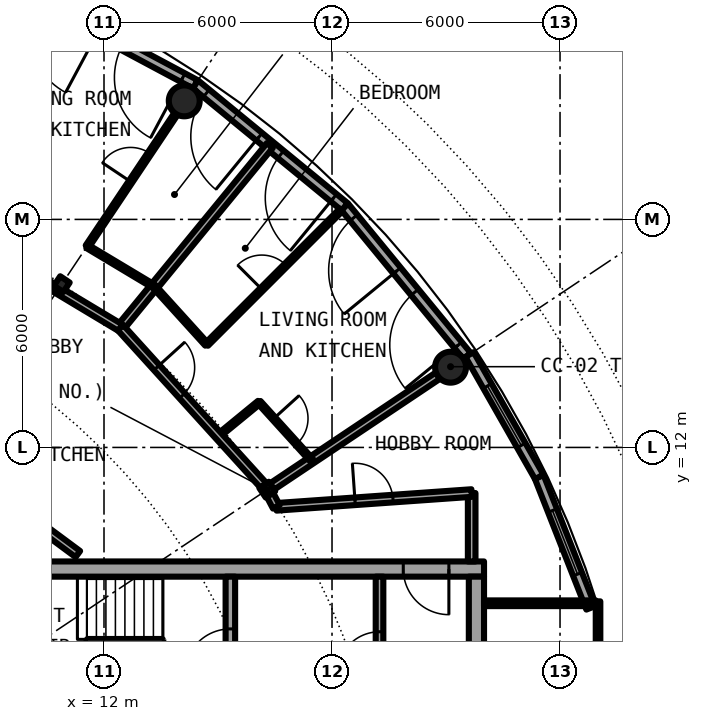
"""IFC4 building model, lengths in metres.
Left out: names, types, materials, properties, quantities, classifications, styles, units other than length and angle.
Written with IfcOpenShell. Run it as: python <this file> out.ifc"""

import sys

from ifc_helpers import new_model, si_unit, direction, frame, frame_2d, origin, origin_2d, place, context, subcontext, project, spatial, rectangle, hollow_circle, i_section, extrude, element, fill, save


model = new_model("IFC4")
c1 = context("Model", 3, precision=1e-05, world=origin(), true_north=direction((0.0, 1.0)))
c2 = subcontext(c1, "Body", "Model", "MODEL_VIEW")
j1 = project(units=[si_unit("LENGTHUNIT", "METRE"), si_unit("PLANEANGLEUNIT", "RADIAN")], contexts=[c1])
p1 = place(None, origin())
s1 = spatial("IfcSite", under=j1, at=p1, CompositionType="ELEMENT")
p2 = place(p1, origin())
s2 = spatial("IfcBuilding", under=s1, at=p2, CompositionType="ELEMENT")
p3 = place(p2, frame((0.0, 0.0, 237.1)))
s3 = spatial("IfcBuildingStorey", under=s2, at=p3, CompositionType="ELEMENT", Elevation=237.1)
for number, where, z_axis, x_axis in (
    (1, (21.119, 14.112, 0.0), (0.0, 0.0, 1.0), (1.0, 0.0, 0.0)),
    (2, (14.112, 21.119, 0.0), (0.0, 0.0, 1.0), (1.0, 0.0, 0.0)),
):
    element("IfcColumn", number, at=place(p3, frame(where, z_axis=z_axis, x_axis=x_axis)), inside=s3, PredefinedType="COLUMN", context=c2, shape_type="SweptSolid", body=[
        extrude(hollow_circle(Radius=0.406, WallThickness=0.03, at=origin_2d()), origin(), (0.0, 0.0, 1.0), 3.05),
    ])
for number, where, z_axis, x_axis in (
    (3, (16.297, 10.889, 0.0), (0.0, 0.0, 1.0), (0.831, 0.556, 0.0)),
    (4, (10.889, 16.297, 0.0), (0.0, 0.0, 1.0), (0.556, 0.831, 0.0)),
):
    element("IfcColumn", number, at=place(p3, frame(where, z_axis=z_axis, x_axis=x_axis)), inside=s3, PredefinedType="COLUMN", context=c2, shape_type="SweptSolid", body=[
        extrude(i_section(OverallWidth=0.3, OverallDepth=0.3, WebThickness=0.011, FlangeThickness=0.019, FilletRadius=0.027, at=origin_2d()), origin(), (0.0, 0.0, 1.0), 3.05),
    ])
p4 = place(p3, frame((21.556, 14.403, 0.0), z_axis=(0.0, 0.0, 1.0), x_axis=(-0.63433059803, 0.77306189429, 0.0)))
e5 = element("IfcWall", 5, at=p4, inside=s3, PredefinedType="SOLIDWALL", context=c2, shape_type="SweptSolid", body=[
    extrude(rectangle(XDim=5.082, YDim=0.25, at=frame_2d((2.541, 0.0))), origin(), (0.0, 0.0, 1.0), 2.7),
])
p5 = place(p4, frame((0.374, 0.0, 0.0)))
e6 = element("IfcOpeningElement", 6, at=p5, cuts=e5, PredefinedType="OPENING", context=c2, shape_type="SweptSolid", body=[
    extrude(rectangle(XDim=1.8, YDim=2.2, at=frame_2d((0.9, 1.1))), frame((0.0, 0.135, 0.0), z_axis=(0.0, -1.0, 0.0), x_axis=(1.0, 0.0, 0.0)), (0.0, 0.0, 1.0), 0.27),
])
p6 = place(p4, frame((2.909, 0.0, 0.0)))
e7 = element("IfcOpeningElement", 7, at=p6, cuts=e5, PredefinedType="OPENING", context=c2, shape_type="SweptSolid", body=[
    extrude(rectangle(XDim=1.8, YDim=2.2, at=frame_2d((0.9, 1.1))), frame((0.0, 0.135, 0.0), z_axis=(0.0, -1.0, 0.0), x_axis=(1.0, 0.0, 0.0)), (0.0, 0.0, 1.0), 0.27),
])
p7 = place(p3, frame((18.332, 18.332, 0.0), z_axis=(0.0, 0.0, 1.0), x_axis=(-0.77306189429, 0.63433059803, 0.0)))
e8 = element("IfcWall", 8, at=p7, inside=s3, PredefinedType="SOLIDWALL", context=c2, shape_type="SweptSolid", body=[
    extrude(rectangle(XDim=5.082, YDim=0.25, at=frame_2d((2.541, 0.0))), origin(), (0.0, 0.0, 1.0), 2.7),
])
p8 = place(p7, frame((0.374, 0.0, 0.0)))
e9 = element("IfcOpeningElement", 9, at=p8, cuts=e8, PredefinedType="OPENING", context=c2, shape_type="SweptSolid", body=[
    extrude(rectangle(XDim=1.8, YDim=2.2, at=frame_2d((0.9, 1.1))), frame((0.0, 0.135, 0.0), z_axis=(0.0, -1.0, 0.0), x_axis=(1.0, 0.0, 0.0)), (0.0, 0.0, 1.0), 0.27),
])
p9 = place(p7, frame((2.909, 0.0, 0.0)))
e10 = element("IfcOpeningElement", 10, at=p9, cuts=e8, PredefinedType="OPENING", context=c2, shape_type="SweptSolid", body=[
    extrude(rectangle(XDim=1.8, YDim=2.2, at=frame_2d((0.9, 1.1))), frame((0.0, 0.135, 0.0), z_axis=(0.0, -1.0, 0.0), x_axis=(1.0, 0.0, 0.0)), (0.0, 0.0, 1.0), 0.27),
])
p10 = place(p3, frame((14.403, 21.556, 0.0), z_axis=(0.0, 0.0, 1.0), x_axis=(-0.881903089468, 0.47143073806, 0.0)))
e11 = element("IfcWall", 11, at=p10, inside=s3, PredefinedType="SOLIDWALL", context=c2, shape_type="SweptSolid", body=[
    extrude(rectangle(XDim=5.082, YDim=0.25, at=frame_2d((2.541, 0.0))), origin(), (0.0, 0.0, 1.0), 2.7),
])
p11 = place(p10, frame((0.374, 0.0, 0.0)))
e12 = element("IfcOpeningElement", 12, at=p11, cuts=e11, PredefinedType="OPENING", context=c2, shape_type="SweptSolid", body=[
    extrude(rectangle(XDim=1.8, YDim=2.2, at=frame_2d((0.9, 1.1))), frame((0.0, 0.135, 0.0), z_axis=(0.0, -1.0, 0.0), x_axis=(1.0, 0.0, 0.0)), (0.0, 0.0, 1.0), 0.27),
])
p12 = place(p10, frame((2.909, 0.0, 0.0)))
e13 = element("IfcOpeningElement", 13, at=p12, cuts=e11, PredefinedType="OPENING", context=c2, shape_type="SweptSolid", body=[
    extrude(rectangle(XDim=1.8, YDim=2.2, at=frame_2d((0.9, 1.1))), frame((0.0, 0.135, 0.0), z_axis=(0.0, -1.0, 0.0), x_axis=(1.0, 0.0, 0.0)), (0.0, 0.0, 1.0), 0.27),
])
p13 = place(p3, frame((24.809, 7.779, 0.0), z_axis=(0.0, 0.0, 1.0), x_axis=(-0.366351636034, 0.930476479432, 0.0)))
e14 = element("IfcWall", 14, at=p13, inside=s3, PredefinedType="SOLIDWALL", context=c2, shape_type="SweptSolid", body=[
    extrude(rectangle(XDim=3.705, YDim=0.25, at=frame_2d((1.852, 0.0))), origin(), (0.0, 0.0, 1.0), 2.7),
])
p14 = place(p13, frame((0.952, 0.0, 0.3)))
e15 = element("IfcOpeningElement", 15, at=p14, cuts=e14, PredefinedType="OPENING", context=c2, shape_type="SweptSolid", body=[
    extrude(rectangle(XDim=1.8, YDim=2.1, at=frame_2d((0.9, 1.05))), frame((0.0, 0.135, 0.0), z_axis=(0.0, -1.0, 0.0), x_axis=(1.0, 0.0, 0.0)), (0.0, 0.0, 1.0), 0.27),
])
p15 = place(p3, frame((23.452, 11.226, 0.0), z_axis=(0.0, 0.0, 1.0), x_axis=(-0.495031435966, 0.868875064325, 0.0)))
e16 = element("IfcWall", 16, at=p15, inside=s3, PredefinedType="SOLIDWALL", context=c2, shape_type="SweptSolid", body=[
    extrude(rectangle(XDim=3.705, YDim=0.25, at=frame_2d((1.853, 0.0))), origin(), (0.0, 0.0, 1.0), 2.7),
])
p16 = place(p15, frame((0.952, 0.0, 0.3)))
e17 = element("IfcOpeningElement", 17, at=p16, cuts=e16, PredefinedType="OPENING", context=c2, shape_type="SweptSolid", body=[
    extrude(rectangle(XDim=1.8, YDim=2.1, at=frame_2d((0.9, 1.05))), frame((0.0, 0.135, 0.0), z_axis=(0.0, -1.0, 0.0), x_axis=(1.0, 0.0, 0.0)), (0.0, 0.0, 1.0), 0.27),
])
p17 = place(p3, frame((22.0, 8.8, 0.0), z_axis=(0.0, 0.0, 1.0), x_axis=(-1.0, 0.0, 0.0)))
e18 = element("IfcWall", 18, at=p17, inside=s3, PredefinedType="SHEAR", context=c2, shape_type="SweptSolid", body=[
    extrude(rectangle(XDim=13.4, YDim=0.4, at=frame_2d((6.7, 0.0))), origin(), (0.0, 0.0, 1.0), 3.05),
])
p18 = place(p17, frame((0.925, 0.0, 0.0)))
e19 = element("IfcOpeningElement", 19, at=p18, cuts=e18, PredefinedType="OPENING", context=c2, shape_type="SweptSolid", body=[
    extrude(rectangle(XDim=1.2, YDim=2.3, at=frame_2d((0.6, 1.15))), frame((0.0, 0.21, 0.0), z_axis=(0.0, -1.0, 0.0), x_axis=(1.0, 0.0, 0.0)), (0.0, 0.0, 1.0), 0.42),
])
p19 = place(p3, frame((21.8, 8.6, 0.0), z_axis=(0.0, 0.0, 1.0), x_axis=(0.0, -1.0, 0.0)))
e20 = element("IfcWall", 20, at=p19, inside=s3, PredefinedType="SHEAR", context=c2, shape_type="SweptSolid", body=[
    extrude(rectangle(XDim=17.2, YDim=0.4, at=frame_2d((8.6, 0.0))), origin(), (0.0, 0.0, 1.0), 3.05),
])
p20 = place(p19, frame((7.7, 0.0, 0.0)))
e21 = element("IfcOpeningElement", 21, at=p20, cuts=e20, PredefinedType="OPENING", context=c2, shape_type="SweptSolid", body=[
    extrude(rectangle(XDim=1.8, YDim=2.3, at=frame_2d((0.9, 1.15))), frame((0.0, 0.21, 0.0), z_axis=(0.0, -1.0, 0.0), x_axis=(1.0, 0.0, 0.0)), (0.0, 0.0, 1.0), 0.42),
])
p21 = place(p3, frame((15.325, 4.65, 0.0), z_axis=(0.0, 0.0, 1.0), x_axis=(0.0, 1.0, 0.0)))
e22 = element("IfcWall", 22, at=p21, inside=s3, PredefinedType="SHEAR", context=c2, shape_type="SweptSolid", body=[
    extrude(rectangle(XDim=3.95, YDim=0.25, at=frame_2d((1.975, 0.0))), origin(), (0.0, 0.0, 1.0), 3.05),
])
p22 = place(p21, frame((1.375, 0.0, 0.0)))
e23 = element("IfcOpeningElement", 23, at=p22, cuts=e22, PredefinedType="OPENING", context=c2, shape_type="SweptSolid", body=[
    extrude(rectangle(XDim=1.2, YDim=2.3, at=frame_2d((0.6, 1.15))), frame((0.0, 0.135, 0.0), z_axis=(0.0, -1.0, 0.0), x_axis=(1.0, 0.0, 0.0)), (0.0, 0.0, 1.0), 0.27),
])
p23 = place(p3, frame((19.25, 1.575, 0.0), z_axis=(0.0, 0.0, 1.0), x_axis=(0.0, 1.0, 0.0)))
e24 = element("IfcWall", 24, at=p23, inside=s3, PredefinedType="SOLIDWALL", context=c2, shape_type="SweptSolid", body=[
    extrude(rectangle(XDim=7.025, YDim=0.2, at=frame_2d((3.513, 0.0))), origin(), (0.0, 0.0, 1.0), 2.7),
])
p24 = place(p23, frame((4.475, 0.0, 0.0)))
e25 = element("IfcOpeningElement", 25, at=p24, cuts=e24, PredefinedType="OPENING", context=c2, shape_type="SweptSolid", body=[
    extrude(rectangle(XDim=1.1, YDim=2.3, at=frame_2d((0.55, 1.15))), frame((0.0, 0.11, 0.0), z_axis=(0.0, -1.0, 0.0), x_axis=(1.0, 0.0, 0.0)), (0.0, 0.0, 1.0), 0.22),
])
p25 = place(p3, frame((22.0, 7.9, 0.0), z_axis=(0.0, 0.0, 1.0), x_axis=(1.0, 0.0, 0.0)))
e26 = element("IfcWall", 26, at=p25, inside=s3, PredefinedType="PARTITIONING", context=c2, shape_type="SweptSolid", body=[
    extrude(rectangle(XDim=2.94, YDim=0.15, at=frame_2d((1.47, 0.0))), origin(), (0.0, 0.0, 1.0), 2.7),
])
p26 = place(p3, frame((25.0, -7.95, 0.0), z_axis=(0.0, 0.0, 1.0), x_axis=(0.0, 1.0, 0.0)))
e27 = element("IfcWall", 27, at=p26, inside=s3, PredefinedType="PARTITIONING", context=c2, shape_type="SweptSolid", body=[
    extrude(rectangle(XDim=15.9, YDim=0.12, at=frame_2d((7.95, 0.0))), origin(), (0.0, 0.0, 1.0), 2.7),
])
p27 = place(p26, frame((0.95, 0.0, 0.1)))
e28 = element("IfcOpeningElement", 28, at=p27, cuts=e27, PredefinedType="OPENING", context=c2, shape_type="SweptSolid", body=[
    extrude(rectangle(XDim=14.0, YDim=2.35, at=frame_2d((7.0, 1.175))), frame((0.0, 0.07, 0.0), z_axis=(0.0, -1.0, 0.0), x_axis=(1.0, 0.0, 0.0)), (0.0, 0.0, 1.0), 0.14),
])
p28 = place(p3, frame((21.675, 9.0, 0.0), z_axis=(0.0, 0.0, 1.0), x_axis=(0.0, 1.0, 0.0)))
e29 = element("IfcWall", 29, at=p28, inside=s3, PredefinedType="PARTITIONING", context=c2, shape_type="SweptSolid", body=[
    extrude(rectangle(XDim=1.8, YDim=0.2, at=frame_2d((0.9, 0.0))), origin(), (0.0, 0.0, 1.0), 2.7),
])
p29 = place(p3, frame((11.56, 17.289, 0.0), z_axis=(0.0, 0.0, 1.0), x_axis=(0.555959489687, 0.831209387475, 0.0)))
e30 = element("IfcWall", 30, at=p29, inside=s3, PredefinedType="PARTITIONING", context=c2, shape_type="SweptSolid", body=[
    extrude(rectangle(XDim=4.203, YDim=0.1, at=frame_2d((2.102, 0.0))), origin(), (0.0, 0.0, 1.0), 2.7),
])
p30 = place(p29, frame((2.051, 0.0, 0.0)))
e31 = element("IfcOpeningElement", 31, at=p30, cuts=e30, PredefinedType="OPENING", context=c2, shape_type="SweptSolid", body=[
    extrude(rectangle(XDim=0.9, YDim=2.3, at=frame_2d((0.45, 1.15))), frame((0.0, 0.06, 0.0), z_axis=(0.0, -1.0, 0.0), x_axis=(1.0, 0.0, 0.0)), (0.0, 0.0, 1.0), 0.12),
])
p31 = place(p3, frame((12.432, 15.153, 0.0), z_axis=(0.0, 0.0, 1.0), x_axis=(0.634356436091, 0.773040692324, 0.0)))
e32 = element("IfcWall", 32, at=p31, inside=s3, PredefinedType="PARTITIONING", context=c2, shape_type="SweptSolid", body=[
    extrude(rectangle(XDim=6.2, YDim=0.2, at=frame_2d((3.1, 0.0))), origin(), (0.0, 0.0, 1.0), 2.7),
])
p32 = place(p3, frame((14.702, 14.711, 0.0), z_axis=(0.0, 0.0, 1.0), x_axis=(0.706911528738, 0.707301979735, 0.0)))
e33 = element("IfcWall", 33, at=p32, inside=s3, PredefinedType="PARTITIONING", context=c2, shape_type="SweptSolid", body=[
    extrude(rectangle(XDim=5.002, YDim=0.1, at=frame_2d((2.501, 0.0))), origin(), (0.0, 0.0, 1.0), 2.7),
])
p33 = place(p32, frame((2.051, 0.0, 0.0)))
e34 = element("IfcOpeningElement", 34, at=p33, cuts=e33, PredefinedType="OPENING", context=c2, shape_type="SweptSolid", body=[
    extrude(rectangle(XDim=0.9, YDim=2.3, at=frame_2d((0.45, 1.15))), frame((0.0, 0.06, 0.0), z_axis=(0.0, -1.0, 0.0), x_axis=(1.0, 0.0, 0.0)), (0.0, 0.0, 1.0), 0.12),
])
p34 = place(p3, frame((15.011, 12.308, 0.0), z_axis=(0.0, 0.0, 1.0), x_axis=(0.773321325714, 0.634014295735, 0.0)))
e35 = element("IfcWall", 35, at=p34, inside=s3, PredefinedType="PARTITIONING", context=c2, shape_type="SweptSolid", body=[
    extrude(rectangle(XDim=1.386, YDim=0.1, at=frame_2d((0.693, 0.0))), origin(), (0.0, 0.0, 1.0), 2.7),
])
p35 = place(p3, frame((16.422, 10.972, 0.0), z_axis=(0.0, 0.0, 1.0), x_axis=(0.831406006746, 0.555665413668, 0.0)))
e36 = element("IfcWall", 36, at=p35, inside=s3, PredefinedType="PARTITIONING", context=c2, shape_type="SweptSolid", body=[
    extrude(rectangle(XDim=5.251, YDim=0.2, at=frame_2d((2.625, 0.0))), origin(), (0.0, 0.0, 1.0), 2.7),
])
p36 = place(p3, frame((16.535, 10.437, 0.0), z_axis=(0.0, 0.0, 1.0), x_axis=(0.997515141784, 0.070452408845, 0.0)))
e37 = element("IfcWall", 37, at=p36, inside=s3, PredefinedType="PARTITIONING", context=c2, shape_type="SweptSolid", body=[
    extrude(rectangle(XDim=5.153, YDim=0.2, at=frame_2d((2.576, 0.0))), origin(), (0.0, 0.0, 1.0), 2.7),
])
p37 = place(p36, frame((2.076, 0.0, 0.0)))
e38 = element("IfcOpeningElement", 38, at=p37, cuts=e37, PredefinedType="OPENING", context=c2, shape_type="SweptSolid", body=[
    extrude(rectangle(XDim=1.0, YDim=2.3, at=frame_2d((0.5, 1.15))), frame((0.0, 0.11, 0.0), z_axis=(0.0, -1.0, 0.0), x_axis=(1.0, 0.0, 0.0)), (0.0, 0.0, 1.0), 0.22),
])
p38 = place(p3, frame((4.357, 14.353, 0.0), z_axis=(0.0, 0.0, 1.0), x_axis=(0.803168959756, -0.595751308923, 0.0)))
e39 = element("IfcWall", 39, at=p38, inside=s3, PredefinedType="PARTITIONING", context=c2, shape_type="SweptSolid", body=[
    extrude(rectangle(XDim=8.659, YDim=0.2, at=frame_2d((4.33, 0.0))), origin(), (0.0, 0.0, 1.0), 2.7),
])
p39 = place(p38, frame((3.829, 0.0, 0.0)))
e40 = element("IfcOpeningElement", 40, at=p39, cuts=e39, PredefinedType="OPENING", context=c2, shape_type="SweptSolid", body=[
    extrude(rectangle(XDim=1.0, YDim=2.3, at=frame_2d((0.5, 1.15))), frame((0.0, 0.11, 0.0), z_axis=(0.0, -1.0, 0.0), x_axis=(1.0, 0.0, 0.0)), (0.0, 0.0, 1.0), 0.22),
])
p40 = place(p3, frame((7.501, 18.108, 0.0), z_axis=(0.0, 0.0, 1.0), x_axis=(0.857560257806, -0.514383518624, 0.0)))
e41 = element("IfcWall", 41, at=p40, inside=s3, PredefinedType="PARTITIONING", context=c2, shape_type="SweptSolid", body=[
    extrude(rectangle(XDim=5.758, YDim=0.2, at=frame_2d((2.879, 0.0))), origin(), (0.0, 0.0, 1.0), 2.45),
])
p41 = place(p40, frame((2.217, 0.0, 0.0)))
e42 = element("IfcOpeningElement", 42, at=p41, cuts=e41, PredefinedType="OPENING", context=c2, shape_type="SweptSolid", body=[
    extrude(rectangle(XDim=1.0, YDim=2.3, at=frame_2d((0.5, 1.15))), frame((0.0, 0.11, 0.0), z_axis=(0.0, -1.0, 0.0), x_axis=(1.0, 0.0, 0.0)), (0.0, 0.0, 1.0), 0.22),
])
p42 = place(p3, frame((12.434, 15.151, 0.0), z_axis=(0.0, 0.0, 1.0), x_axis=(0.671619657805, -0.740896102871, 0.0)))
e43 = element("IfcWall", 43, at=p42, inside=s3, PredefinedType="PARTITIONING", context=c2, shape_type="SweptSolid", body=[
    extrude(rectangle(XDim=5.6, YDim=0.2, at=frame_2d((2.8, 0.0))), origin(), (0.0, 0.0, 1.0), 2.45),
])
p43 = place(p42, frame((1.417, 0.0, 0.0)))
e44 = element("IfcOpeningElement", 44, at=p43, cuts=e43, PredefinedType="OPENING", context=c2, shape_type="SweptSolid", body=[
    extrude(rectangle(XDim=1.0, YDim=2.3, at=frame_2d((0.5, 1.15))), frame((0.0, 0.11, 0.0), z_axis=(0.0, -1.0, 0.0), x_axis=(1.0, 0.0, 0.0)), (0.0, 0.0, 1.0), 0.22),
])
p44 = place(p3, frame((16.367, 10.756, 0.0), z_axis=(0.0, 0.0, 1.0), x_axis=(0.465802239822, -0.884888848035, 0.0)))
e45 = element("IfcWall", 45, at=p44, inside=s3, PredefinedType="PARTITIONING", context=c2, shape_type="SweptSolid", body=[
    extrude(rectangle(XDim=0.361, YDim=0.2, at=frame_2d((0.18, 0.0))), origin(), (0.0, 0.0, 1.0), 2.7),
])
p45 = place(p3, frame((11.56, 17.289, 0.0), z_axis=(0.0, 0.0, 1.0), x_axis=(0.857713062192, -0.514128683254, 0.0)))
e46 = element("IfcWall", 46, at=p45, inside=s3, PredefinedType="PARTITIONING", context=c2, shape_type="SweptSolid", body=[
    extrude(rectangle(XDim=2.054, YDim=0.1, at=frame_2d((1.027, 0.0))), origin(), (0.0, 0.0, 1.0), 2.7),
])
p46 = place(p3, frame((13.321, 16.233, 0.0), z_axis=(0.0, 0.0, 1.0), x_axis=(0.671678456097, -0.74084279818, 0.0)))
e47 = element("IfcWall", 47, at=p46, inside=s3, PredefinedType="PARTITIONING", context=c2, shape_type="SweptSolid", body=[
    extrude(rectangle(XDim=2.054, YDim=0.1, at=frame_2d((1.027, 0.0))), origin(), (0.0, 0.0, 1.0), 2.7),
])
p47 = place(p3, frame((16.081, 13.189, 0.0), z_axis=(0.0, 0.0, 1.0), x_axis=(0.671678456097, -0.74084279818, 0.0)))
e48 = element("IfcWall", 48, at=p47, inside=s3, PredefinedType="PARTITIONING", context=c2, shape_type="SweptSolid", body=[
    extrude(rectangle(XDim=2.054, YDim=0.1, at=frame_2d((1.027, 0.0))), origin(), (0.0, 0.0, 1.0), 2.7),
])
p48 = place(p47, frame((0.577, 0.0, 0.0)))
e49 = element("IfcOpeningElement", 49, at=p48, cuts=e48, PredefinedType="OPENING", context=c2, shape_type="SweptSolid", body=[
    extrude(rectangle(XDim=0.9, YDim=2.3, at=frame_2d((0.45, 1.15))), frame((0.0, 0.06, 0.0), z_axis=(0.0, -1.0, 0.0), x_axis=(1.0, 0.0, 0.0)), (0.0, 0.0, 1.0), 0.12),
])
p49 = place(p5, origin())
e50 = element("IfcDoor", 50, at=p49, inside=s3, OperationType="SINGLE_SWING_LEFT", PredefinedType="DOOR", context=c2, shape_type="SweptSolid", body=[
    extrude(rectangle(XDim=1.8, YDim=2.2, at=frame_2d((0.9, 1.1))), frame((0.0, 0.025, 0.0), z_axis=(0.0, -1.0, 0.0), x_axis=(1.0, 0.0, 0.0)), (0.0, 0.0, 1.0), 0.05),
])
fill(e6, e50)
p50 = place(p6, origin())
e51 = element("IfcDoor", 51, at=p50, inside=s3, OperationType="SINGLE_SWING_LEFT", PredefinedType="DOOR", context=c2, shape_type="SweptSolid", body=[
    extrude(rectangle(XDim=1.8, YDim=2.2, at=frame_2d((0.9, 1.1))), frame((0.0, 0.025, 0.0), z_axis=(0.0, -1.0, 0.0), x_axis=(1.0, 0.0, 0.0)), (0.0, 0.0, 1.0), 0.05),
])
fill(e7, e51)
p51 = place(p8, origin())
e52 = element("IfcDoor", 52, at=p51, inside=s3, OperationType="SINGLE_SWING_LEFT", PredefinedType="DOOR", context=c2, shape_type="SweptSolid", body=[
    extrude(rectangle(XDim=1.8, YDim=2.2, at=frame_2d((0.9, 1.1))), frame((0.0, 0.025, 0.0), z_axis=(0.0, -1.0, 0.0), x_axis=(1.0, 0.0, 0.0)), (0.0, 0.0, 1.0), 0.05),
])
fill(e9, e52)
p52 = place(p9, origin())
e53 = element("IfcDoor", 53, at=p52, inside=s3, OperationType="SINGLE_SWING_LEFT", PredefinedType="DOOR", context=c2, shape_type="SweptSolid", body=[
    extrude(rectangle(XDim=1.8, YDim=2.2, at=frame_2d((0.9, 1.1))), frame((0.0, 0.025, 0.0), z_axis=(0.0, -1.0, 0.0), x_axis=(1.0, 0.0, 0.0)), (0.0, 0.0, 1.0), 0.05),
])
fill(e10, e53)
p53 = place(p11, origin())
e54 = element("IfcDoor", 54, at=p53, inside=s3, OperationType="SINGLE_SWING_LEFT", PredefinedType="DOOR", context=c2, shape_type="SweptSolid", body=[
    extrude(rectangle(XDim=1.8, YDim=2.2, at=frame_2d((0.9, 1.1))), frame((0.0, 0.025, 0.0), z_axis=(0.0, -1.0, 0.0), x_axis=(1.0, 0.0, 0.0)), (0.0, 0.0, 1.0), 0.05),
])
fill(e12, e54)
p54 = place(p14, origin())
e55 = element("IfcWindow", 55, at=p54, inside=s3, PartitioningType="SINGLE_PANEL", PredefinedType="WINDOW", context=c2, shape_type="SweptSolid", body=[
    extrude(rectangle(XDim=1.8, YDim=2.1, at=frame_2d((0.9, 1.05))), frame((0.0, 0.03, 0.0), z_axis=(0.0, -1.0, 0.0), x_axis=(1.0, 0.0, 0.0)), (0.0, 0.0, 1.0), 0.06),
])
fill(e15, e55)
p55 = place(p16, origin())
e56 = element("IfcWindow", 56, at=p55, inside=s3, PartitioningType="SINGLE_PANEL", PredefinedType="WINDOW", context=c2, shape_type="SweptSolid", body=[
    extrude(rectangle(XDim=1.8, YDim=2.1, at=frame_2d((0.9, 1.05))), frame((0.0, 0.03, 0.0), z_axis=(0.0, -1.0, 0.0), x_axis=(1.0, 0.0, 0.0)), (0.0, 0.0, 1.0), 0.06),
])
fill(e17, e56)
p56 = place(p22, origin())
e57 = element("IfcDoor", 57, at=p56, inside=s3, OperationType="SINGLE_SWING_LEFT", PredefinedType="DOOR", context=c2, shape_type="SweptSolid", body=[
    extrude(rectangle(XDim=1.2, YDim=2.3, at=frame_2d((0.6, 1.15))), frame((0.0, 0.025, 0.0), z_axis=(0.0, -1.0, 0.0), x_axis=(1.0, 0.0, 0.0)), (0.0, 0.0, 1.0), 0.05),
])
fill(e23, e57)
p57 = place(p24, origin())
e58 = element("IfcDoor", 58, at=p57, inside=s3, OperationType="SINGLE_SWING_LEFT", PredefinedType="DOOR", context=c2, shape_type="SweptSolid", body=[
    extrude(rectangle(XDim=1.1, YDim=2.3, at=frame_2d((0.55, 1.15))), frame((0.0, 0.025, 0.0), z_axis=(0.0, -1.0, 0.0), x_axis=(1.0, 0.0, 0.0)), (0.0, 0.0, 1.0), 0.05),
])
fill(e25, e58)
p58 = place(p18, origin())
e59 = element("IfcDoor", 59, at=p58, inside=s3, OperationType="SINGLE_SWING_RIGHT", PredefinedType="DOOR", context=c2, shape_type="SweptSolid", body=[
    extrude(rectangle(XDim=1.2, YDim=2.3, at=frame_2d((0.6, 1.15))), frame((0.0, 0.025, 0.0), z_axis=(0.0, -1.0, 0.0), x_axis=(1.0, 0.0, 0.0)), (0.0, 0.0, 1.0), 0.05),
])
fill(e19, e59)
p59 = place(p27, origin())
e60 = element("IfcWindow", 60, at=p59, inside=s3, PartitioningType="SINGLE_PANEL", PredefinedType="WINDOW", context=c2, shape_type="SweptSolid", body=[
    extrude(rectangle(XDim=14.0, YDim=2.35, at=frame_2d((7.0, 1.175))), frame((0.0, 0.03, 0.0), z_axis=(0.0, -1.0, 0.0), x_axis=(1.0, 0.0, 0.0)), (0.0, 0.0, 1.0), 0.06),
])
fill(e28, e60)
p60 = place(p43, origin())
e61 = element("IfcDoor", 61, at=p60, inside=s3, OperationType="SINGLE_SWING_LEFT", PredefinedType="DOOR", context=c2, shape_type="SweptSolid", body=[
    extrude(rectangle(XDim=1.0, YDim=2.3, at=frame_2d((0.5, 1.15))), frame((0.0, 0.025, 0.0), z_axis=(0.0, -1.0, 0.0), x_axis=(1.0, 0.0, 0.0)), (0.0, 0.0, 1.0), 0.05),
])
fill(e44, e61)
p61 = place(p48, origin())
e62 = element("IfcDoor", 62, at=p61, inside=s3, OperationType="SINGLE_SWING_RIGHT", PredefinedType="DOOR", context=c2, shape_type="SweptSolid", body=[
    extrude(rectangle(XDim=0.9, YDim=2.3, at=frame_2d((0.45, 1.15))), frame((0.0, 0.025, 0.0), z_axis=(0.0, -1.0, 0.0), x_axis=(1.0, 0.0, 0.0)), (0.0, 0.0, 1.0), 0.05),
])
fill(e49, e62)
p62 = place(p33, origin())
e63 = element("IfcDoor", 63, at=p62, inside=s3, OperationType="SINGLE_SWING_LEFT", PredefinedType="DOOR", context=c2, shape_type="SweptSolid", body=[
    extrude(rectangle(XDim=0.9, YDim=2.3, at=frame_2d((0.45, 1.15))), frame((0.0, 0.025, 0.0), z_axis=(0.0, -1.0, 0.0), x_axis=(1.0, 0.0, 0.0)), (0.0, 0.0, 1.0), 0.05),
])
fill(e34, e63)
p63 = place(p30, origin())
e64 = element("IfcDoor", 64, at=p63, inside=s3, OperationType="SINGLE_SWING_RIGHT", PredefinedType="DOOR", context=c2, shape_type="SweptSolid", body=[
    extrude(rectangle(XDim=0.9, YDim=2.3, at=frame_2d((0.45, 1.15))), frame((0.0, 0.025, 0.0), z_axis=(0.0, -1.0, 0.0), x_axis=(1.0, 0.0, 0.0)), (0.0, 0.0, 1.0), 0.05),
])
fill(e31, e64)
p64 = place(p37, origin())
e65 = element("IfcDoor", 65, at=p64, inside=s3, OperationType="SINGLE_SWING_LEFT", PredefinedType="DOOR", context=c2, shape_type="SweptSolid", body=[
    extrude(rectangle(XDim=1.0, YDim=2.3, at=frame_2d((0.5, 1.15))), frame((0.0, 0.025, 0.0), z_axis=(0.0, -1.0, 0.0), x_axis=(1.0, 0.0, 0.0)), (0.0, 0.0, 1.0), 0.05),
])
fill(e38, e65)
save(model, sys.argv[1])
